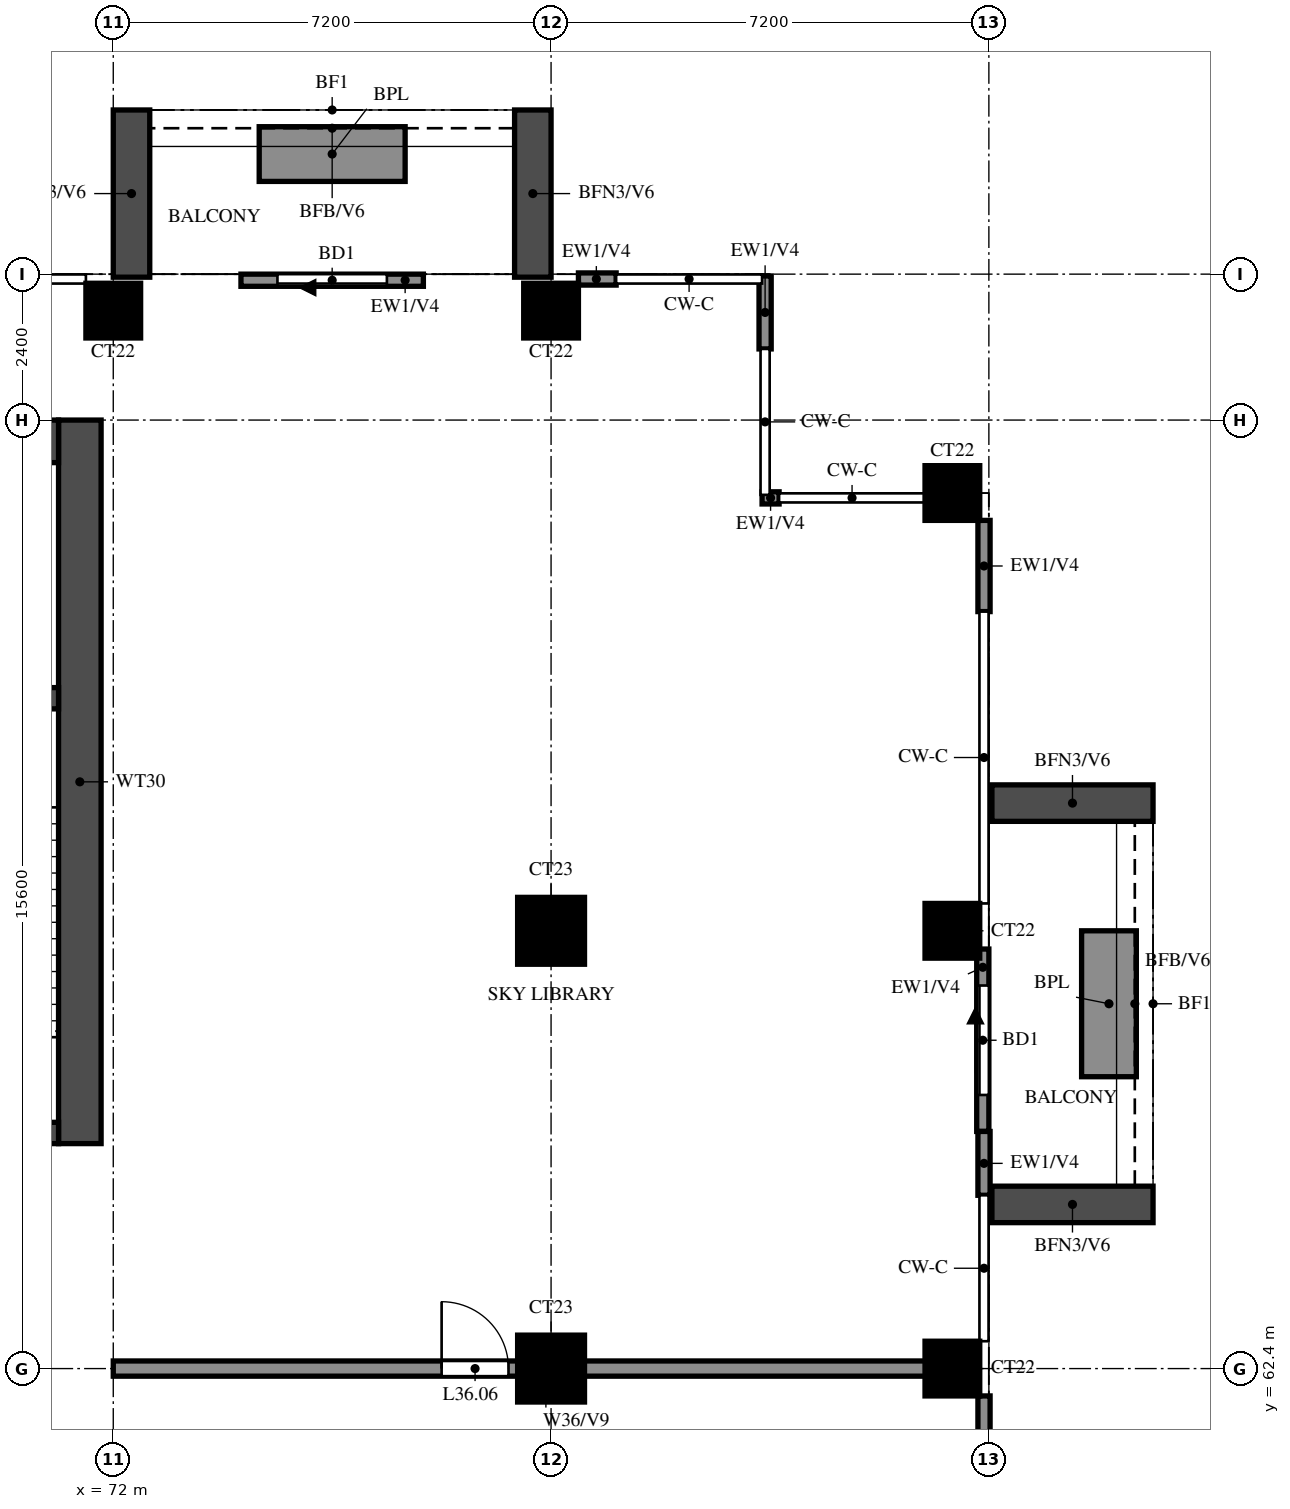
"""IFC4 building model, lengths in metres.
Left out: names, types, materials, properties, quantities, classifications, styles, units other than length and angle.
Written with IfcOpenShell. Run it as: python <this file> out.ifc"""

import sys

from ifc_helpers import new_model, si_unit, direction, frame, frame_2d, origin, origin_2d, place, context, subcontext, project, spatial, rectangle, extrude, source, transform, mapped, element, fill, save


model = new_model("IFC4")
c1 = context("Model", 3, precision=1e-05, world=origin(), true_north=direction((0.0, 1.0)))
c2 = subcontext(c1, "Body", "Model", "MODEL_VIEW")
j1 = project(units=[si_unit("LENGTHUNIT", "METRE"), si_unit("PLANEANGLEUNIT", "RADIAN")], contexts=[c1])
p1 = place(None, origin())
s1 = spatial("IfcSite", under=j1, at=p1, CompositionType="ELEMENT")
p2 = place(p1, origin())
s2 = spatial("IfcBuilding", under=s1, at=p2, CompositionType="ELEMENT")
p3 = place(p2, frame((0.0, 0.0, 137.5)))
s3 = spatial("IfcBuildingStorey", under=s2, at=p3, CompositionType="ELEMENT", Elevation=137.5)
m1 = source(origin(), c2, "Body", "SweptSolid", [
    extrude(rectangle(XDim=1.1, YDim=1.1, at=origin_2d()), origin(), (0.0, 0.0, 1.0), 5.2),
])
p4 = place(p3, frame((79.2, 62.4, 0.0), z_axis=(0.0, 0.0, 1.0), x_axis=(1.0, 0.0, 0.0)))
e1 = element("IfcColumn", 1, at=p4, inside=s3, PredefinedType="COLUMN", context=c2, shape_type="MappedRepresentation", body=[
    mapped(m1, transform((0.0, 0.0, 0.0))),
])
m2 = source(origin(), c2, "Body", "SweptSolid", [
    extrude(rectangle(XDim=0.9, YDim=0.9, at=origin_2d()), origin(), (0.0, 0.0, 1.0), 5.2),
])
p5 = place(p3, frame((85.8, 62.4, 0.0), z_axis=(0.0, 0.0, 1.0), x_axis=(1.0, 0.0, 0.0)))
e2 = element("IfcColumn", 2, at=p5, inside=s3, PredefinedType="COLUMN", context=c2, shape_type="MappedRepresentation", body=[
    mapped(m2, transform((0.0, 0.0, 0.0))),
])
p6 = place(p3, frame((79.2, 69.6, 0.0), z_axis=(0.0, 0.0, 1.0), x_axis=(1.0, 0.0, 0.0)))
e3 = element("IfcColumn", 3, at=p6, inside=s3, PredefinedType="COLUMN", context=c2, shape_type="MappedRepresentation", body=[
    mapped(m1, transform((0.0, 0.0, 0.0))),
])
for number, where, z_axis, x_axis in (
    (4, (85.8, 69.6, 0.0), (0.0, 0.0, 1.0), (1.0, 0.0, 0.0)),
    (5, (85.8, 76.8, 0.0), (0.0, 0.0, 1.0), (1.0, 0.0, 0.0)),
    (6, (72.0, 79.8, 0.0), (0.0, 0.0, 1.0), (1.0, 0.0, 0.0)),
    (7, (79.2, 79.8, 0.0), (0.0, 0.0, 1.0), (1.0, 0.0, 0.0)),
):
    element("IfcColumn", number, at=place(p3, frame(where, z_axis=z_axis, x_axis=x_axis)), inside=s3, PredefinedType="COLUMN", context=c2, shape_type="MappedRepresentation", body=[
        mapped(m2, transform((0.0, 0.0, 0.0))),
    ])
p7 = place(p3, frame((71.45, 66.1, 0.0), z_axis=(0.0, 0.0, 1.0), x_axis=(0.0, 1.0, 0.0)))
e8 = element("IfcWall", 8, at=p7, inside=s3, PredefinedType="SHEAR", context=c2, shape_type="SweptSolid", body=[
    extrude(rectangle(XDim=11.9, YDim=0.7, at=frame_2d((5.95, 0.0))), origin(), (0.0, 0.0, 1.0), 5.2),
])
p8 = place(p3, frame((29.7, 77.65, 0.0), z_axis=(0.0, 0.0, 1.0), x_axis=(1.0, 0.0, 0.0)))
e9 = element("IfcWall", 9, at=p8, inside=s3, PredefinedType="SHEAR", context=c2, shape_type="SweptSolid", body=[
    extrude(rectangle(XDim=41.4, YDim=0.7, at=frame_2d((20.7, 0.0))), origin(), (0.0, 0.0, 1.0), 5.2),
])
p9 = place(p3, frame((29.7, 66.275, 0.0), z_axis=(0.0, 0.0, 1.0), x_axis=(1.0, 0.0, 0.0)))
e10 = element("IfcWall", 10, at=p9, inside=s3, PredefinedType="SHEAR", context=c2, shape_type="SweptSolid", body=[
    extrude(rectangle(XDim=41.4, YDim=0.35, at=frame_2d((20.7, 0.0))), origin(), (0.0, 0.0, 1.0), 5.2),
])
p10 = place(p9, frame((0.925, 0.0, 0.0)))
e11 = element("IfcOpeningElement", 11, at=p10, cuts=e10, PredefinedType="OPENING", context=c2, shape_type="SweptSolid", body=[
    extrude(rectangle(XDim=1.1, YDim=2.1, at=frame_2d((0.55, 1.05))), frame((0.0, 0.185, 0.0), z_axis=(0.0, -1.0, 0.0), x_axis=(1.0, 0.0, 0.0)), (0.0, 0.0, 1.0), 0.37),
])
p11 = place(p9, frame((3.712, 0.0, 0.0)))
e12 = element("IfcOpeningElement", 12, at=p11, cuts=e10, PredefinedType="OPENING", context=c2, shape_type="SweptSolid", body=[
    extrude(rectangle(XDim=1.8, YDim=2.1, at=frame_2d((0.9, 1.05))), frame((0.0, 0.185, 0.0), z_axis=(0.0, -1.0, 0.0), x_axis=(1.0, 0.0, 0.0)), (0.0, 0.0, 1.0), 0.37),
])
p12 = place(p3, frame((67.975, 73.425, 0.0), z_axis=(0.0, 0.0, 1.0), x_axis=(1.0, 0.0, 0.0)))
e13 = element("IfcWall", 13, at=p12, inside=s3, PredefinedType="SHEAR", context=c2, shape_type="SweptSolid", body=[
    extrude(rectangle(XDim=3.125, YDim=0.35, at=frame_2d((1.562, 0.0))), origin(), (0.0, 0.0, 1.0), 5.2),
])
p13 = place(p3, frame((86.3, 66.3, 0.0), z_axis=(0.0, 0.0, 1.0), x_axis=(0.0, 1.0, 0.0)))
e14 = element("IfcWall", 14, at=p13, inside=s3, PredefinedType="SOLIDWALL", context=c2, shape_type="SweptSolid", body=[
    extrude(rectangle(XDim=3.0, YDim=0.2, at=frame_2d((1.5, 0.0))), origin(), (0.0, 0.0, 1.0), 5.2),
])
p14 = place(p13, frame((0.6, 0.0, 0.0)))
e15 = element("IfcOpeningElement", 15, at=p14, cuts=e14, PredefinedType="OPENING", context=c2, shape_type="SweptSolid", body=[
    extrude(rectangle(XDim=1.8, YDim=2.4, at=frame_2d((0.9, 1.2))), frame((0.0, 0.11, 0.0), z_axis=(0.0, -1.0, 0.0), x_axis=(1.0, 0.0, 0.0)), (0.0, 0.0, 1.0), 0.22),
])
p15 = place(p3, frame((86.32, 60.45, 0.0), z_axis=(0.0, 0.0, 1.0), x_axis=(0.0, 1.0, 0.0)))
e16 = element("IfcWall", 16, at=p15, inside=s3, PredefinedType="SOLIDWALL", context=c2, shape_type="SweptSolid", body=[
    extrude(rectangle(XDim=1.5, YDim=0.2, at=frame_2d((0.75, 0.0))), origin(), (0.0, 0.0, 1.0), 5.2),
])
p16 = place(p3, frame((86.32, 65.25, 0.0), z_axis=(0.0, 0.0, 1.0), x_axis=(0.0, 1.0, 0.0)))
e17 = element("IfcWall", 17, at=p16, inside=s3, PredefinedType="SOLIDWALL", context=c2, shape_type="SweptSolid", body=[
    extrude(rectangle(XDim=1.05, YDim=0.2, at=frame_2d((0.525, 0.0))), origin(), (0.0, 0.0, 1.0), 5.2),
])
p17 = place(p3, frame((86.32, 74.85, 0.0), z_axis=(0.0, 0.0, 1.0), x_axis=(0.0, 1.0, 0.0)))
e18 = element("IfcWall", 18, at=p17, inside=s3, PredefinedType="SOLIDWALL", context=c2, shape_type="SweptSolid", body=[
    extrude(rectangle(XDim=1.5, YDim=0.2, at=frame_2d((0.75, 0.0))), origin(), (0.0, 0.0, 1.0), 5.2),
])
p18 = place(p3, frame((82.95, 76.72, 0.0), z_axis=(0.0, 0.0, 1.0), x_axis=(-1.0, 0.0, 0.0)))
e19 = element("IfcWall", 19, at=p18, inside=s3, PredefinedType="SOLIDWALL", context=c2, shape_type="SweptSolid", body=[
    extrude(rectangle(XDim=0.28, YDim=0.2, at=frame_2d((0.14, 0.0))), origin(), (0.0, 0.0, 1.0), 5.2),
])
p19 = place(p3, frame((82.72, 79.17, 0.0), z_axis=(0.0, 0.0, 1.0), x_axis=(0.0, 1.0, 0.0)))
e20 = element("IfcWall", 20, at=p19, inside=s3, PredefinedType="SOLIDWALL", context=c2, shape_type="SweptSolid", body=[
    extrude(rectangle(XDim=1.2, YDim=0.2, at=frame_2d((0.6, 0.0))), origin(), (0.0, 0.0, 1.0), 5.2),
])
p20 = place(p3, frame((77.1, 80.3, 0.0), z_axis=(0.0, 0.0, 1.0), x_axis=(-1.0, 0.0, 0.0)))
e21 = element("IfcWall", 21, at=p20, inside=s3, PredefinedType="SOLIDWALL", context=c2, shape_type="SweptSolid", body=[
    extrude(rectangle(XDim=3.0, YDim=0.2, at=frame_2d((1.5, 0.0))), origin(), (0.0, 0.0, 1.0), 5.2),
])
p21 = place(p20, frame((0.6, 0.0, 0.0)))
e22 = element("IfcOpeningElement", 22, at=p21, cuts=e21, PredefinedType="OPENING", context=c2, shape_type="SweptSolid", body=[
    extrude(rectangle(XDim=1.8, YDim=2.4, at=frame_2d((0.9, 1.2))), frame((0.0, 0.11, 0.0), z_axis=(0.0, -1.0, 0.0), x_axis=(1.0, 0.0, 0.0)), (0.0, 0.0, 1.0), 0.22),
])
p22 = place(p3, frame((80.27, 80.32, 0.0), z_axis=(0.0, 0.0, 1.0), x_axis=(-1.0, 0.0, 0.0)))
e23 = element("IfcWall", 23, at=p22, inside=s3, PredefinedType="SOLIDWALL", context=c2, shape_type="SweptSolid", body=[
    extrude(rectangle(XDim=0.62, YDim=0.2, at=frame_2d((0.31, 0.0))), origin(), (0.0, 0.0, 1.0), 5.2),
])
for number, where, z_axis, x_axis in (
    (24, (86.45, 65.1, 0.0), (0.0, 0.0, 1.0), (1.0, 0.0, 0.0)),
    (25, (86.45, 71.7, 0.0), (0.0, 0.0, 1.0), (1.0, 0.0, 0.0)),
):
    element("IfcWall", number, at=place(p3, frame(where, z_axis=z_axis, x_axis=x_axis)), inside=s3, PredefinedType="SOLIDWALL", context=c2, shape_type="SweptSolid", body=[
        extrude(rectangle(XDim=2.65, YDim=0.6, at=frame_2d((1.325, 0.0))), origin(), (0.0, 0.0, 1.0), 4.9),
    ])
p23 = place(p3, frame((88.375, 67.2, 0.0), z_axis=(0.0, 0.0, 1.0), x_axis=(0.0, 1.0, 0.0)))
e26 = element("IfcWall", 26, at=p23, inside=s3, PredefinedType="SOLIDWALL", context=c2, shape_type="SweptSolid", body=[
    extrude(rectangle(XDim=2.4, YDim=0.9, at=frame_2d((1.2, 0.0))), origin(), (0.0, 0.0, 1.0), 0.9),
])
for number, where, z_axis, x_axis in (
    (27, (78.9, 80.35, 0.0), (0.0, 0.0, 1.0), (0.0, 1.0, 0.0)),
    (28, (72.3, 80.35, 0.0), (0.0, 0.0, 1.0), (0.0, 1.0, 0.0)),
):
    element("IfcWall", number, at=place(p3, frame(where, z_axis=z_axis, x_axis=x_axis)), inside=s3, PredefinedType="SOLIDWALL", context=c2, shape_type="SweptSolid", body=[
        extrude(rectangle(XDim=2.75, YDim=0.6, at=frame_2d((1.375, 0.0))), origin(), (0.0, 0.0, 1.0), 4.9),
    ])
p24 = place(p3, frame((76.8, 82.375, 0.0), z_axis=(0.0, 0.0, 1.0), x_axis=(-1.0, 0.0, 0.0)))
e29 = element("IfcWall", 29, at=p24, inside=s3, PredefinedType="SOLIDWALL", context=c2, shape_type="SweptSolid", body=[
    extrude(rectangle(XDim=2.4, YDim=0.9, at=frame_2d((1.2, 0.0))), origin(), (0.0, 0.0, 1.0), 0.9),
])
p25 = place(p3, frame((72.0, 62.4, 0.0), z_axis=(0.0, 0.0, 1.0), x_axis=(1.0, 0.0, 0.0)))
e30 = element("IfcWall", 30, at=p25, inside=s3, PredefinedType="SOLIDWALL", context=c2, shape_type="SweptSolid", body=[
    extrude(rectangle(XDim=14.23, YDim=0.25, at=frame_2d((7.115, 0.0))), origin(), (0.0, 0.0, 1.0), 5.2),
])
p26 = place(p25, frame((5.4, 0.0, 0.0)))
e31 = element("IfcOpeningElement", 31, at=p26, cuts=e30, PredefinedType="OPENING", context=c2, shape_type="SweptSolid", body=[
    extrude(rectangle(XDim=1.1, YDim=2.1, at=frame_2d((0.55, 1.05))), frame((0.0, 0.135, 0.0), z_axis=(0.0, -1.0, 0.0), x_axis=(1.0, 0.0, 0.0)), (0.0, 0.0, 1.0), 0.27),
])
p27 = place(p14, origin())
e32 = element("IfcDoor", 32, at=p27, inside=s3, OperationType="DOUBLE_DOOR_SLIDING", PredefinedType="DOOR", context=c2, shape_type="SweptSolid", body=[
    extrude(rectangle(XDim=1.8, YDim=2.4, at=frame_2d((0.9, 1.2))), frame((0.0, 0.025, 0.0), z_axis=(0.0, -1.0, 0.0), x_axis=(1.0, 0.0, 0.0)), (0.0, 0.0, 1.0), 0.05),
])
fill(e15, e32)
p28 = place(p21, origin())
e33 = element("IfcDoor", 33, at=p28, inside=s3, OperationType="DOUBLE_DOOR_SLIDING", PredefinedType="DOOR", context=c2, shape_type="SweptSolid", body=[
    extrude(rectangle(XDim=1.8, YDim=2.4, at=frame_2d((0.9, 1.2))), frame((0.0, 0.025, 0.0), z_axis=(0.0, -1.0, 0.0), x_axis=(1.0, 0.0, 0.0)), (0.0, 0.0, 1.0), 0.05),
])
fill(e22, e33)
p29 = place(p26, origin())
e34 = element("IfcDoor", 34, at=p29, inside=s3, OperationType="SINGLE_SWING_LEFT", PredefinedType="DOOR", context=c2, shape_type="SweptSolid", body=[
    extrude(rectangle(XDim=1.1, YDim=2.1, at=frame_2d((0.55, 1.05))), frame((0.0, 0.025, 0.0), z_axis=(0.0, -1.0, 0.0), x_axis=(1.0, 0.0, 0.0)), (0.0, 0.0, 1.0), 0.05),
])
fill(e31, e34)
save(model, sys.argv[1])
